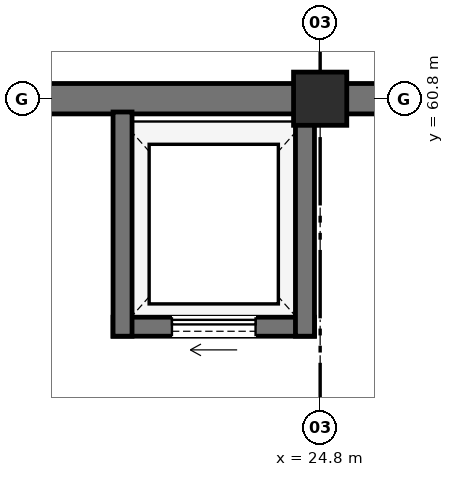
"""IFC4 building model, lengths in metres.
Left out: names, types, materials, properties, quantities, classifications, styles, units other than length and angle.
Written with IfcOpenShell. Run it as: python <this file> out.ifc"""

import sys

from ifc_helpers import new_model, si_unit, direction, frame, frame_2d, origin, origin_2d, place, context, subcontext, project, spatial, rectangle, extrude, element, fill, save


model = new_model("IFC4")
c1 = context("Model", 3, precision=1e-05, world=origin(), true_north=direction((0.0, 1.0)))
c2 = subcontext(c1, "Body", "Model", "MODEL_VIEW")
j1 = project(units=[si_unit("LENGTHUNIT", "METRE"), si_unit("PLANEANGLEUNIT", "RADIAN")], contexts=[c1])
p1 = place(None, origin())
s1 = spatial("IfcSite", under=j1, at=p1, CompositionType="ELEMENT")
p2 = place(p1, origin())
s2 = spatial("IfcBuilding", under=s1, at=p2, CompositionType="ELEMENT")
p3 = place(p2, frame((0.0, 0.0, -4.5)))
s3 = spatial("IfcBuildingStorey", under=s2, at=p3, CompositionType="ELEMENT", Elevation=-4.5)
p4 = place(p3, frame((24.8, 60.8, 0.0), z_axis=(0.0, 0.0, 1.0), x_axis=(1.0, 0.0, 0.0)))
e1 = element("IfcColumn", 1, at=p4, inside=s3, PredefinedType="COLUMN", context=c2, shape_type="SweptSolid", body=[
    extrude(rectangle(XDim=0.7, YDim=0.7, at=origin_2d()), origin(), (0.0, 0.0, 1.0), 4.5),
])
p5 = place(p3, frame((41.8, 60.8, 0.0), z_axis=(0.0, 0.0, 1.0), x_axis=(-1.0, 0.0, 0.0)))
e2 = element("IfcWall", 2, at=p5, inside=s3, PredefinedType="USERDEFINED", context=c2, shape_type="SweptSolid", body=[
    extrude(rectangle(XDim=34.0, YDim=0.4, at=frame_2d((17.0, 0.0))), origin(), (0.0, 0.0, 1.0), 4.5),
])
p6 = place(p3, frame((22.075, 57.8, 0.0), z_axis=(0.0, 0.0, 1.0), x_axis=(1.0, 0.0, 0.0)))
e3 = element("IfcWall", 3, at=p6, inside=s3, PredefinedType="SOLIDWALL", context=c2, shape_type="SweptSolid", body=[
    extrude(rectangle(XDim=2.65, YDim=0.25, at=frame_2d((1.325, 0.0))), origin(), (0.0, 0.0, 1.0), 4.18),
])
p7 = place(p6, frame((0.775, 0.0, 0.0)))
e4 = element("IfcOpeningElement", 4, at=p7, cuts=e3, PredefinedType="OPENING", context=c2, shape_type="SweptSolid", body=[
    extrude(rectangle(XDim=1.1, YDim=2.2, at=frame_2d((0.55, 1.1))), frame((0.0, 0.135, 0.0), z_axis=(0.0, -1.0, 0.0), x_axis=(1.0, 0.0, 0.0)), (0.0, 0.0, 1.0), 0.27),
])
for number, where, z_axis, x_axis in (
    (5, (22.2, 57.675, 0.0), (0.0, 0.0, 1.0), (0.0, 1.0, 0.0)),
    (6, (24.6, 57.675, 0.0), (0.0, 0.0, 1.0), (0.0, 1.0, 0.0)),
):
    element("IfcWall", number, at=place(p3, frame(where, z_axis=z_axis, x_axis=x_axis)), inside=s3, PredefinedType="SOLIDWALL", context=c2, shape_type="SweptSolid", body=[
        extrude(rectangle(XDim=2.95, YDim=0.25, at=frame_2d((1.475, 0.0))), origin(), (0.0, 0.0, 1.0), 4.18),
    ])
p8 = place(p7, origin())
e7 = element("IfcDoor", 7, at=p8, inside=s3, OperationType="SLIDING_TO_LEFT", PredefinedType="DOOR", context=c2, shape_type="SweptSolid", body=[
    extrude(rectangle(XDim=1.1, YDim=2.2, at=frame_2d((0.55, 1.1))), frame((0.0, 0.025, 0.0), z_axis=(0.0, -1.0, 0.0), x_axis=(1.0, 0.0, 0.0)), (0.0, 0.0, 1.0), 0.05),
])
fill(e4, e7)
save(model, sys.argv[1])
